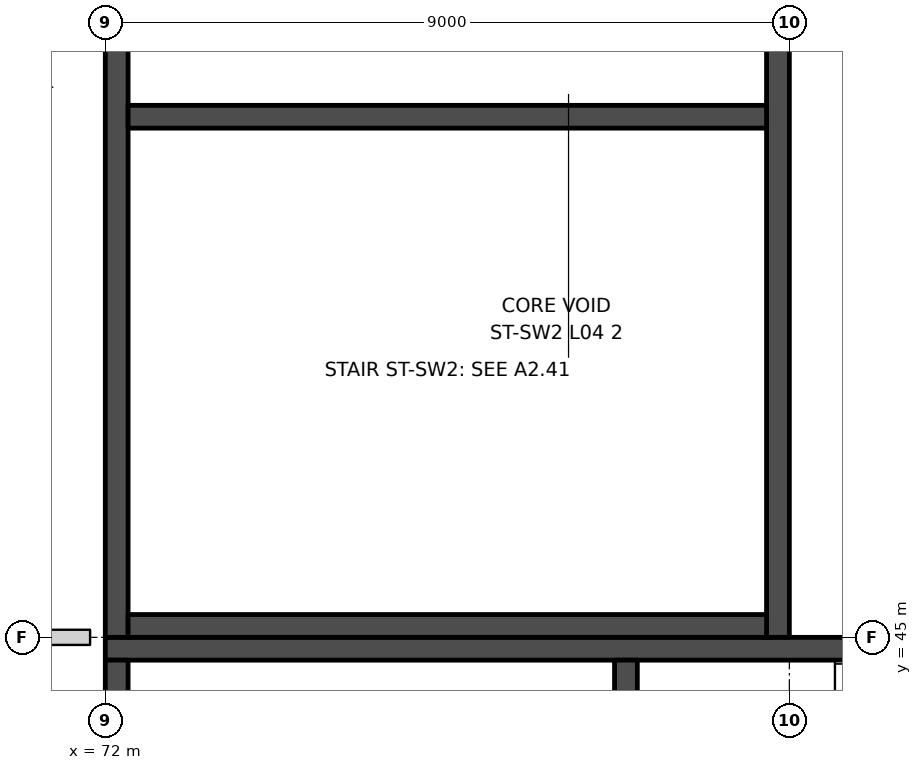
"""IFC4 building model, lengths in metres.
Left out: names, types, materials, properties, quantities, classifications, styles, units other than length and angle.
Written with IfcOpenShell. Run it as: python <this file> out.ifc"""

import sys

from ifc_helpers import new_model, si_unit, direction, frame, frame_2d, origin, place, context, subcontext, project, spatial, rectangle, extrude, element, save


model = new_model("IFC4")
c1 = context("Model", 3, precision=1e-05, world=origin(), true_north=direction((0.0, 1.0)))
c2 = subcontext(c1, "Body", "Model", "MODEL_VIEW")
j1 = project(units=[si_unit("LENGTHUNIT", "METRE"), si_unit("PLANEANGLEUNIT", "RADIAN")], contexts=[c1])
p1 = place(None, origin())
s1 = spatial("IfcSite", under=j1, at=p1, CompositionType="ELEMENT")
p2 = place(p1, origin())
s2 = spatial("IfcBuilding", under=s1, at=p2, CompositionType="ELEMENT")
p3 = place(p2, frame((0.0, 0.0, 28.0)))
s3 = spatial("IfcBuildingStorey", under=s2, at=p3, CompositionType="ELEMENT", Elevation=28.0)
p4 = place(p3, frame((68.9, 45.0, 0.0), z_axis=(0.0, 0.0, 1.0), x_axis=(1.0, 0.0, 0.0)))
e1 = element("IfcWall", 1, at=p4, inside=s3, PredefinedType="PARTITIONING", context=c2, shape_type="SweptSolid", body=[
    extrude(rectangle(XDim=2.9, YDim=0.2, at=frame_2d((1.45, 0.0))), origin(), (0.0, 0.0, 1.0), 4.2),
])
p5 = place(p3, frame((90.0, 44.85, 0.0), z_axis=(0.0, 0.0, 1.0), x_axis=(-1.0, 0.0, 0.0)))
e2 = element("IfcWall", 2, at=p5, inside=s3, PredefinedType="SHEAR", context=c2, shape_type="SweptSolid", body=[
    extrude(rectangle(XDim=18.0, YDim=0.3, at=frame_2d((9.0, 0.0))), origin(), (0.0, 0.0, 1.0), 5.5),
])
p6 = place(p5, frame((1.5, 0.0, 0.0)))
e3 = element("IfcOpeningElement", 3, at=p6, cuts=e2, PredefinedType="OPENING", context=c2, shape_type="SweptSolid", body=[
    extrude(rectangle(XDim=1.2, YDim=2.1, at=frame_2d((0.6, 1.05))), frame((0.0, 0.16, 0.0), z_axis=(0.0, -1.0, 0.0), x_axis=(1.0, 0.0, 0.0)), (0.0, 0.0, 1.0), 0.32),
])
for number, where, z_axis, x_axis in (
    (4, (72.15, 44.7, 0.0), (0.0, 0.0, 1.0), (0.0, -1.0, 0.0)),
    (5, (78.85, 44.7, 0.0), (0.0, 0.0, 1.0), (0.0, -1.0, 0.0)),
):
    element("IfcWall", number, at=place(p3, frame(where, z_axis=z_axis, x_axis=x_axis)), inside=s3, PredefinedType="SHEAR", context=c2, shape_type="SweptSolid", body=[
        extrude(rectangle(XDim=8.4, YDim=0.3, at=frame_2d((4.2, 0.0))), origin(), (0.0, 0.0, 1.0), 5.5),
    ])
p7 = place(p3, frame((80.85, 63.0, 0.0), z_axis=(0.0, 0.0, 1.0), x_axis=(0.0, -1.0, 0.0)))
e6 = element("IfcWall", 6, at=p7, inside=s3, PredefinedType="SHEAR", context=c2, shape_type="SweptSolid", body=[
    extrude(rectangle(XDim=18.0, YDim=0.3, at=frame_2d((9.0, 0.0))), origin(), (0.0, 0.0, 1.0), 5.5),
])
p8 = place(p7, frame((1.5, 0.0, 0.0)))
e7 = element("IfcOpeningElement", 7, at=p8, cuts=e6, PredefinedType="OPENING", context=c2, shape_type="SweptSolid", body=[
    extrude(rectangle(XDim=1.2, YDim=2.1, at=frame_2d((0.6, 1.05))), frame((0.0, 0.16, 0.0), z_axis=(0.0, -1.0, 0.0), x_axis=(1.0, 0.0, 0.0)), (0.0, 0.0, 1.0), 0.32),
])
p9 = place(p3, frame((72.15, 63.0, 0.0), z_axis=(0.0, 0.0, 1.0), x_axis=(0.0, -1.0, 0.0)))
e8 = element("IfcWall", 8, at=p9, inside=s3, PredefinedType="SHEAR", context=c2, shape_type="SweptSolid", body=[
    extrude(rectangle(XDim=18.0, YDim=0.3, at=frame_2d((9.0, 0.0))), origin(), (0.0, 0.0, 1.0), 5.5),
])
for number, where, z_axis, x_axis in (
    (9, (80.7, 45.15, 0.0), (0.0, 0.0, 1.0), (-1.0, 0.0, 0.0)),
    (10, (80.7, 51.85, 0.0), (0.0, 0.0, 1.0), (-1.0, 0.0, 0.0)),
):
    element("IfcWall", number, at=place(p3, frame(where, z_axis=z_axis, x_axis=x_axis)), inside=s3, PredefinedType="SHEAR", context=c2, shape_type="SweptSolid", body=[
        extrude(rectangle(XDim=8.4, YDim=0.3, at=frame_2d((4.2, 0.0))), origin(), (0.0, 0.0, 1.0), 5.5),
    ])
save(model, sys.argv[1])
